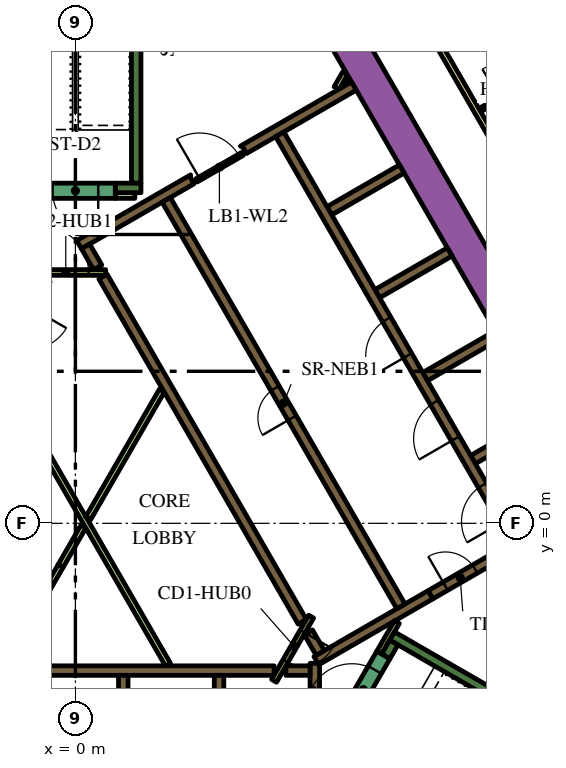
"""IFC4 building model, lengths in metres.
Left out: names, types, materials, properties, quantities, classifications, styles, units other than length and angle.
Written with IfcOpenShell. Run it as: python <this file> out.ifc"""

import sys

from ifc_helpers import new_model, si_unit, direction, frame, frame_2d, origin, place, context, subcontext, project, spatial, polyline, rectangle, outline, extrude, element, fill, save


model = new_model("IFC4")
c1 = context("Model", 3, precision=1e-05, world=origin(), true_north=direction((0.0, 1.0)))
c2 = subcontext(c1, "Body", "Model", "MODEL_VIEW")
j1 = project(units=[si_unit("LENGTHUNIT", "METRE"), si_unit("PLANEANGLEUNIT", "RADIAN")], contexts=[c1])
p1 = place(None, origin())
s1 = spatial("IfcSite", under=j1, at=p1, CompositionType="ELEMENT")
p2 = place(p1, origin())
s2 = spatial("IfcBuilding", under=s1, at=p2, CompositionType="ELEMENT")
p3 = place(p2, frame((0.0, 0.0, 51.0)))
s3 = spatial("IfcBuildingStorey", under=s2, at=p3, CompositionType="ELEMENT", Elevation=51.0)
p4 = place(p3, frame((6.776, 13.364, 0.0), z_axis=(0.0, 0.0, 1.0), x_axis=(0.500004177138, -0.8660229921, 0.0)))
e1 = element("IfcWall", 1, at=p4, inside=s3, PredefinedType="SOLIDWALL", context=c2, shape_type="SweptSolid", body=[
    extrude(rectangle(XDim=20.204, YDim=0.9, at=frame_2d((10.102, 0.0))), origin(), (0.0, 0.0, 1.0), 3.9),
])
p5 = place(p3, frame((8.334, -2.964, 0.0), z_axis=(0.0, 0.0, 1.0), x_axis=(0.866016039709, -0.500016218704, 0.0)))
e2 = element("IfcWall", 2, at=p5, inside=s3, PredefinedType="SOLIDWALL", context=c2, shape_type="SweptSolid", body=[
    extrude(rectangle(XDim=7.05, YDim=0.25, at=frame_2d((3.525, 0.0))), origin(), (0.0, 0.0, 1.0), 3.9),
])
p6 = place(p3, frame((8.168, -3.503, 0.0), z_axis=(0.0, 0.0, 1.0), x_axis=(0.49972245349, 0.866185586049, 0.0)))
e3 = element("IfcWall", 3, at=p6, inside=s3, PredefinedType="SOLIDWALL", context=c2, shape_type="SweptSolid", body=[
    extrude(rectangle(XDim=0.425, YDim=0.25, at=frame_2d((0.212, 0.0))), origin(), (0.0, 0.0, 1.0), 3.9),
])
p7 = place(p3, frame((1.6, 8.95, 0.0), z_axis=(0.0, 0.0, 1.0), x_axis=(0.0, 1.0, 0.0)))
e4 = element("IfcWall", 4, at=p7, inside=s3, PredefinedType="SOLIDWALL", context=c2, shape_type="SweptSolid", body=[
    extrude(rectangle(XDim=6.8, YDim=0.25, at=frame_2d((3.4, 0.0))), origin(), (0.0, 0.0, 1.0), 3.9),
])
p8 = place(p3, frame((1.05, 8.825, 0.0), z_axis=(0.0, 0.0, 1.0), x_axis=(1.0, 0.0, 0.0)))
e5 = element("IfcWall", 5, at=p8, inside=s3, PredefinedType="SOLIDWALL", context=c2, shape_type="SweptSolid", body=[
    extrude(rectangle(XDim=0.675, YDim=0.25, at=frame_2d((0.337, 0.0))), origin(), (0.0, 0.0, 1.0), 3.9),
])
p9 = place(p3, frame((-5.259, -3.875, 0.0), z_axis=(0.0, 0.0, 1.0), x_axis=(1.0, 0.0, 0.0)))
e6 = element("IfcWall", 6, at=p9, inside=s3, PredefinedType="SOLIDWALL", context=c2, shape_type="SweptSolid", body=[
    extrude(rectangle(XDim=10.489, YDim=0.25, at=frame_2d((5.244, 0.0))), origin(), (0.0, 0.0, 1.0), 3.9),
])
for number, where, z_axis, x_axis in (
    (7, (3.78, -4.0, 0.0), (0.0, 0.0, 1.0), (0.0, -1.0, 0.0)),
    (8, (1.26, -4.0, 0.0), (0.0, 0.0, 1.0), (0.0, -1.0, 0.0)),
):
    element("IfcWall", number, at=place(p3, frame(where, z_axis=z_axis, x_axis=x_axis)), inside=s3, PredefinedType="SOLIDWALL", context=c2, shape_type="SweptSolid", body=[
        extrude(rectangle(XDim=2.2, YDim=0.25, at=frame_2d((1.1, 0.0))), origin(), (0.0, 0.0, 1.0), 3.9),
    ])
p10 = place(p3, frame((6.3, -7.27, 0.0), z_axis=(0.0, 0.0, 1.0), x_axis=(0.0, 1.0, 0.0)))
e9 = element("IfcWall", 9, at=p10, inside=s3, PredefinedType="SOLIDWALL", context=c2, shape_type="SweptSolid", body=[
    extrude(rectangle(XDim=3.586, YDim=0.25, at=frame_2d((1.793, 0.0))), origin(), (0.0, 0.0, 1.0), 3.9),
])
p11 = place(p3, frame((5.538, -3.875, 0.0), z_axis=(0.0, 0.0, 1.0), x_axis=(1.0, 0.0, 0.0)))
e10 = element("IfcWall", 10, at=p11, inside=s3, PredefinedType="SOLIDWALL", context=c2, shape_type="SweptSolid", body=[
    extrude(rectangle(XDim=0.637, YDim=0.25, at=frame_2d((0.318, 0.0))), origin(), (0.0, 0.0, 1.0), 3.9),
])
p12 = place(p3, frame((10.464, 1.677, 0.0), z_axis=(0.0, 0.0, 1.0), x_axis=(0.86605622881, 0.499946605688, 0.0)))
e11 = element("IfcWall", 11, at=p12, inside=s3, PredefinedType="SOLIDWALL", context=c2, shape_type="SweptSolid", body=[
    extrude(rectangle(XDim=2.2, YDim=0.25, at=frame_2d((1.1, 0.0))), origin(), (0.0, 0.0, 1.0), 3.9),
])
p13 = place(p3, frame((9.346, -1.879, 0.0), z_axis=(0.0, 0.0, 1.0), x_axis=(-0.866048528039, -0.499959945477, 0.0)))
e12 = element("IfcWall", 12, at=p13, inside=s3, PredefinedType="SOLIDWALL", context=c2, shape_type="SweptSolid", body=[
    extrude(rectangle(XDim=3.47, YDim=0.25, at=frame_2d((1.735, 0.0))), origin(), (0.0, 0.0, 1.0), 3.9),
])
p14 = place(p3, frame((6.13, -2.867, 0.0), z_axis=(0.0, 0.0, 1.0), x_axis=(0.500160776593, -0.865932559475, 0.0)))
e13 = element("IfcWall", 13, at=p14, inside=s3, PredefinedType="SOLIDWALL", context=c2, shape_type="SweptSolid", body=[
    extrude(rectangle(XDim=0.627, YDim=0.25, at=frame_2d((0.313, 0.0))), origin(), (0.0, 0.0, 1.0), 3.9),
])
for number, where, z_axis, x_axis in (
    (14, (9.204, 3.859, 0.0), (0.0, 0.0, 1.0), (0.866, 0.5, 0.0)),
    (15, (7.944, 6.041, 0.0), (0.0, 0.0, 1.0), (0.866, 0.5, 0.0)),
    (16, (6.684, 8.224, 0.0), (0.0, 0.0, 1.0), (0.866, 0.5, 0.0)),
):
    element("IfcWall", number, at=place(p3, frame(where, z_axis=z_axis, x_axis=x_axis)), inside=s3, PredefinedType="SOLIDWALL", context=c2, shape_type="SweptSolid", body=[
        extrude(rectangle(XDim=2.2, YDim=0.25, at=frame_2d((1.1, 0.0))), origin(), (0.0, 0.0, 1.0), 3.9),
    ])
p15 = place(p3, origin())
e17 = element("IfcWall", 17, at=p15, inside=s3, PredefinedType="SOLIDWALL", context=c2, shape_type="SweptSolid", body=[
    extrude(outline(polyline([(2.776, 8.733), (2.499, 8.573), (2.498, 8.573), (2.498, 8.573), (2.282, 8.448), (2.282, 8.448), (0.377, 7.348), (0.16, 7.223), (0.035, 7.439), (3.032, 9.169), (3.03, 9.152), (3.03, 9.133), (3.031, 9.113), (3.035, 9.094), (3.04, 9.075), (3.047, 9.057), (3.056, 9.039), (3.119, 8.931), (2.776, 8.733)])), origin(), (0.0, 0.0, 1.0), 3.9),
])
e18 = element("IfcWall", 18, at=p15, inside=s3, PredefinedType="SOLIDWALL", context=c2, shape_type="SweptSolid", body=[
    extrude(outline(polyline([(5.27, 10.173), (5.27, 10.173), (4.683, 9.834), (4.504, 9.731), (4.442, 9.839), (4.431, 9.856), (4.419, 9.871), (4.406, 9.885), (4.39, 9.898), (4.374, 9.909), (4.357, 9.918), (4.341, 9.925), (7.266, 11.614), (7.391, 11.398), (5.486, 10.298), (5.486, 10.298), (5.27, 10.173), (5.27, 10.173)])), origin(), (0.0, 0.0, 1.0), 3.9),
])
p16 = place(p3, frame((0.268, 7.285, 0.0), z_axis=(0.0, 0.0, 1.0), x_axis=(0.500098681536, -0.865968422476, 0.0)))
e19 = element("IfcWall", 19, at=p16, inside=s3, PredefinedType="SOLIDWALL", context=c2, shape_type="SweptSolid", body=[
    extrude(rectangle(XDim=0.636, YDim=0.25, at=frame_2d((0.318, 0.0))), origin(), (0.0, 0.0, 1.0), 3.9),
])
p17 = place(p3, frame((5.97, -2.591, 0.0), z_axis=(0.0, 0.0, 1.0), x_axis=(-0.499994469932, 0.866028596547, 0.0)))
e20 = element("IfcWall", 20, at=p17, inside=s3, PredefinedType="SOLIDWALL", context=c2, shape_type="SweptSolid", body=[
    extrude(rectangle(XDim=10.488, YDim=0.25, at=frame_2d((5.244, 0.0))), origin(), (0.0, 0.0, 1.0), 3.9),
])
p18 = place(p3, frame((8.459, -2.599, 0.0), z_axis=(0.0, 0.0, 1.0), x_axis=(-0.500041054325, -0.866001699761, 0.0)))
e21 = element("IfcWall", 21, at=p18, inside=s3, PredefinedType="PARTITIONING", context=c2, shape_type="SweptSolid", body=[
    extrude(rectangle(XDim=0.929, YDim=0.15, at=frame_2d((0.464, 0.0))), origin(), (0.0, 0.0, 1.0), 3.9),
])
p19 = place(p3, frame((2.435, -3.718, 0.0), z_axis=(0.0, 0.0, 1.0), x_axis=(-0.499985176046, 0.866033962229, 0.0)))
e22 = element("IfcWall", 22, at=p19, inside=s3, PredefinedType="PARTITIONING", context=c2, shape_type="SweptSolid", body=[
    extrude(rectangle(XDim=8.875, YDim=0.15, at=frame_2d((4.438, 0.0))), origin(), (0.0, 0.0, 1.0), 2.75),
])
p20 = place(p3, frame((0.336, 0.132, 0.0), z_axis=(0.0, 0.0, 1.0), x_axis=(0.500001957507, 0.866024273614, 0.0)))
e23 = element("IfcWall", 23, at=p20, inside=s3, PredefinedType="PARTITIONING", context=c2, shape_type="SweptSolid", body=[
    extrude(rectangle(XDim=3.881, YDim=0.15, at=frame_2d((1.941, 0.0))), origin(), (0.0, 0.0, 1.0), 2.75),
])
p21 = place(p3, frame((-0.387, -1.121, 0.0), z_axis=(0.0, 0.0, 1.0), x_axis=(0.500057179532, 0.865992388649, 0.0)))
e24 = element("IfcWall", 24, at=p21, inside=s3, PredefinedType="PARTITIONING", context=c2, shape_type="SweptSolid", body=[
    extrude(rectangle(XDim=1.199, YDim=0.15, at=frame_2d((0.6, 0.0))), origin(), (0.0, 0.0, 1.0), 2.75),
])
p22 = place(p3, frame((1.05, 8.625, 0.0), z_axis=(0.0, 0.0, 1.0), x_axis=(1.0, 0.0, 0.0)))
e25 = element("IfcWall", 25, at=p22, inside=s3, PredefinedType="PARTITIONING", context=c2, shape_type="SweptSolid", body=[
    extrude(rectangle(XDim=0.514, YDim=0.15, at=frame_2d((0.257, 0.0))), origin(), (0.0, 0.0, 1.0), 2.75),
])
p23 = place(p3, frame((6.872, 11.45, 0.0), z_axis=(0.0, 0.0, 1.0), x_axis=(0.499846793097, 0.866113839764, 0.0)))
e26 = element("IfcWall", 26, at=p23, inside=s3, PredefinedType="PARTITIONING", context=c2, shape_type="SweptSolid", body=[
    extrude(rectangle(XDim=0.453, YDim=0.15, at=frame_2d((0.227, 0.0))), origin(), (0.0, 0.0, 1.0), 2.75),
])
p24 = place(p3, frame((7.131, 11.6, 0.0), z_axis=(0.0, 0.0, 1.0), x_axis=(0.498600033135, 0.866832167699, 0.0)))
e27 = element("IfcWall", 27, at=p24, inside=s3, PredefinedType="PARTITIONING", context=c2, shape_type="SweptSolid", body=[
    extrude(rectangle(XDim=0.107, YDim=0.15, at=frame_2d((0.053, 0.0))), origin(), (0.0, 0.0, 1.0), 2.75),
])
p25 = place(p3, frame((11.553, -0.46, 0.0), z_axis=(0.0, 0.0, 1.0), x_axis=(-0.500006514828, 0.866021642414, 0.0)))
e28 = element("IfcWall", 28, at=p25, inside=s3, PredefinedType="SOLIDWALL", context=c2, shape_type="SweptSolid", body=[
    extrude(rectangle(XDim=12.35, YDim=0.25, at=frame_2d((6.175, 0.0))), origin(), (0.0, 0.0, 1.0), 3.9),
])
p26 = place(p25, frame((0.585, 0.0, 0.0)))
e29 = element("IfcOpeningElement", 29, at=p26, cuts=e28, PredefinedType="OPENING", context=c2, shape_type="SweptSolid", body=[
    extrude(rectangle(XDim=1.1, YDim=2.1, at=frame_2d((0.55, 1.05))), frame((0.0, 0.135, 0.0), z_axis=(0.0, -1.0, 0.0), x_axis=(1.0, 0.0, 0.0)), (0.0, 0.0, 1.0), 0.27),
])
p27 = place(p25, frame((3.105, 0.0, 0.0)))
e30 = element("IfcOpeningElement", 30, at=p27, cuts=e28, PredefinedType="OPENING", context=c2, shape_type="SweptSolid", body=[
    extrude(rectangle(XDim=1.1, YDim=2.1, at=frame_2d((0.55, 1.05))), frame((0.0, 0.135, 0.0), z_axis=(0.0, -1.0, 0.0), x_axis=(1.0, 0.0, 0.0)), (0.0, 0.0, 1.0), 0.27),
])
p28 = place(p25, frame((5.625, 0.0, 0.0)))
e31 = element("IfcOpeningElement", 31, at=p28, cuts=e28, PredefinedType="OPENING", context=c2, shape_type="SweptSolid", body=[
    extrude(rectangle(XDim=1.1, YDim=2.1, at=frame_2d((0.55, 1.05))), frame((0.0, 0.135, 0.0), z_axis=(0.0, -1.0, 0.0), x_axis=(1.0, 0.0, 0.0)), (0.0, 0.0, 1.0), 0.27),
])
p29 = place(p3, frame((8.565, -2.185, 0.0), z_axis=(0.0, 0.0, 1.0), x_axis=(-0.499997954832, 0.866026584559, 0.0)))
e32 = element("IfcWall", 32, at=p29, inside=s3, PredefinedType="SOLIDWALL", context=c2, shape_type="SweptSolid", body=[
    extrude(rectangle(XDim=12.35, YDim=0.25, at=frame_2d((6.175, 0.0))), origin(), (0.0, 0.0, 1.0), 3.9),
])
p30 = place(p29, frame((5.725, 0.0, 0.0)))
e33 = element("IfcOpeningElement", 33, at=p30, cuts=e32, PredefinedType="OPENING", context=c2, shape_type="SweptSolid", body=[
    extrude(rectangle(XDim=0.9, YDim=2.1, at=frame_2d((0.45, 1.05))), frame((0.0, 0.135, 0.0), z_axis=(0.0, -1.0, 0.0), x_axis=(1.0, 0.0, 0.0)), (0.0, 0.0, 1.0), 0.27),
])
p31 = place(p3, frame((7.053, -5.284, 0.0), z_axis=(0.0, 0.0, 1.0), x_axis=(0.500078061341, 0.865980330357, 0.0)))
e34 = element("IfcWall", 34, at=p31, inside=s3, PredefinedType="SOLIDWALL", context=c2, shape_type="SweptSolid", body=[
    extrude(rectangle(XDim=2.1, YDim=0.4, at=frame_2d((1.05, 0.0))), origin(), (0.0, 0.0, 1.0), 3.9),
])
p32 = place(p31, frame((0.45, 0.0, 0.0)))
e35 = element("IfcOpeningElement", 35, at=p32, cuts=e34, PredefinedType="OPENING", context=c2, shape_type="SweptSolid", body=[
    extrude(rectangle(XDim=1.2, YDim=2.1, at=frame_2d((0.6, 1.05))), frame((0.0, 0.21, 0.0), z_axis=(0.0, -1.0, 0.0), x_axis=(1.0, 0.0, 0.0)), (0.0, 0.0, 1.0), 0.42),
])
p33 = place(p3, frame((9.346, -1.879, 0.0), z_axis=(0.0, 0.0, 1.0), x_axis=(0.866047807691, 0.499961193289, 0.0)))
e36 = element("IfcWall", 36, at=p33, inside=s3, PredefinedType="SOLIDWALL", context=c2, shape_type="SweptSolid", body=[
    extrude(rectangle(XDim=1.8, YDim=0.25, at=frame_2d((0.9, 0.0))), origin(), (0.0, 0.0, 1.0), 3.9),
])
p34 = place(p33, frame((0.45, 0.0, 0.0)))
e37 = element("IfcOpeningElement", 37, at=p34, cuts=e36, PredefinedType="OPENING", context=c2, shape_type="SweptSolid", body=[
    extrude(rectangle(XDim=0.9, YDim=2.1, at=frame_2d((0.45, 1.05))), frame((0.0, 0.135, 0.0), z_axis=(0.0, -1.0, 0.0), x_axis=(1.0, 0.0, 0.0)), (0.0, 0.0, 1.0), 0.27),
])
p35 = place(p3, frame((1.05, 8.75, 0.0), z_axis=(0.0, 0.0, 1.0), x_axis=(-1.0, 0.0, 0.0)))
e38 = element("IfcWall", 38, at=p35, inside=s3, PredefinedType="SOLIDWALL", context=c2, shape_type="SweptSolid", body=[
    extrude(rectangle(XDim=2.1, YDim=0.4, at=frame_2d((1.05, 0.0))), origin(), (0.0, 0.0, 1.0), 3.9),
])
p36 = place(p35, frame((0.45, 0.0, 0.0)))
e39 = element("IfcOpeningElement", 39, at=p36, cuts=e38, PredefinedType="OPENING", context=c2, shape_type="SweptSolid", body=[
    extrude(rectangle(XDim=1.2, YDim=2.1, at=frame_2d((0.6, 1.05))), frame((0.0, 0.21, 0.0), z_axis=(0.0, -1.0, 0.0), x_axis=(1.0, 0.0, 0.0)), (0.0, 0.0, 1.0), 0.42),
])
p37 = place(p3, frame((6.203, -2.456, 0.0), z_axis=(0.0, 0.0, 1.0), x_axis=(-0.500043961785, -0.866000020948, 0.0)))
e40 = element("IfcWall", 40, at=p37, inside=s3, PredefinedType="PARTITIONING", context=c2, shape_type="SweptSolid", body=[
    extrude(rectangle(XDim=1.95, YDim=0.15, at=frame_2d((0.975, 0.0))), origin(), (0.0, 0.0, 1.0), 3.9),
])
p38 = place(p37, frame((0.45, 0.0, 0.0)))
e41 = element("IfcOpeningElement", 41, at=p38, cuts=e40, PredefinedType="OPENING", context=c2, shape_type="SweptSolid", body=[
    extrude(rectangle(XDim=0.9, YDim=2.1, at=frame_2d((0.45, 1.05))), frame((0.0, 0.085, 0.0), z_axis=(0.0, -1.0, 0.0), x_axis=(1.0, 0.0, 0.0)), (0.0, 0.0, 1.0), 0.17),
])
p39 = place(p3, frame((-1.303, 6.6, 0.0), z_axis=(0.0, 0.0, 1.0), x_axis=(1.0, 0.0, 0.0)))
e42 = element("IfcWall", 42, at=p39, inside=s3, PredefinedType="PARTITIONING", context=c2, shape_type="SweptSolid", body=[
    extrude(rectangle(XDim=2.1, YDim=0.15, at=frame_2d((1.05, 0.0))), origin(), (0.0, 0.0, 1.0), 3.9),
])
p40 = place(p39, frame((0.45, 0.0, 0.0)))
e43 = element("IfcOpeningElement", 43, at=p40, cuts=e42, PredefinedType="OPENING", context=c2, shape_type="SweptSolid", body=[
    extrude(rectangle(XDim=1.2, YDim=2.1, at=frame_2d((0.6, 1.05))), frame((0.0, 0.085, 0.0), z_axis=(0.0, -1.0, 0.0), x_axis=(1.0, 0.0, 0.0)), (0.0, 0.0, 1.0), 0.17),
])
p41 = place(p3, frame((3.183, 9.02, 0.0), z_axis=(0.0, 0.0, 1.0), x_axis=(0.866034573852, 0.49998411664, 0.0)))
e44 = element("IfcWall", 44, at=p41, inside=s3, PredefinedType="PARTITIONING", context=c2, shape_type="SweptSolid", body=[
    extrude(rectangle(XDim=1.4, YDim=0.09, at=frame_2d((0.7, 0.0))), origin(), (0.0, 0.0, 1.0), 2.75),
])
p42 = place(p41, frame((0.1, 0.0, 0.0)))
e45 = element("IfcOpeningElement", 45, at=p42, cuts=e44, PredefinedType="OPENING", context=c2, shape_type="SweptSolid", body=[
    extrude(rectangle(XDim=1.2, YDim=2.1, at=frame_2d((0.6, 1.05))), frame((0.0, 0.055, 0.0), z_axis=(0.0, -1.0, 0.0), x_axis=(1.0, 0.0, 0.0)), (0.0, 0.0, 1.0), 0.11),
])
p43 = place(p3, frame((-1.287, -2.679, 0.0), z_axis=(0.0, 0.0, 1.0), x_axis=(0.499961193289, 0.866047807691, 0.0)))
e46 = element("IfcWall", 46, at=p43, inside=s3, PredefinedType="PARTITIONING", context=c2, shape_type="SweptSolid", body=[
    extrude(rectangle(XDim=1.8, YDim=0.15, at=frame_2d((0.9, 0.0))), origin(), (0.0, 0.0, 1.0), 2.75),
])
p44 = place(p43, frame((0.45, 0.0, 0.0)))
e47 = element("IfcOpeningElement", 47, at=p44, cuts=e46, PredefinedType="OPENING", context=c2, shape_type="SweptSolid", body=[
    extrude(rectangle(XDim=0.9, YDim=2.1, at=frame_2d((0.45, 1.05))), frame((0.0, 0.085, 0.0), z_axis=(0.0, -1.0, 0.0), x_axis=(1.0, 0.0, 0.0)), (0.0, 0.0, 1.0), 0.17),
])
p45 = place(p3, frame((6.163, 18.475, 0.0), z_axis=(0.0, 0.0, 1.0), x_axis=(0.500001317485, -0.866024643133, 0.0)))
e48 = element("IfcWall", 48, at=p45, inside=s3, PredefinedType="PARTITIONING", context=c2, shape_type="SweptSolid", body=[
    extrude(rectangle(XDim=25.767, YDim=0.15, at=frame_2d((12.883, 0.0))), origin(), (0.0, 0.0, 1.0), 2.75),
])
p46 = place(p45, frame((24.586, 0.0, 0.0)))
e49 = element("IfcOpeningElement", 49, at=p46, cuts=e48, PredefinedType="OPENING", context=c2, shape_type="SweptSolid", body=[
    extrude(rectangle(XDim=1.0, YDim=2.1, at=frame_2d((0.5, 1.05))), frame((0.0, 0.085, 0.0), z_axis=(0.0, -1.0, 0.0), x_axis=(1.0, 0.0, 0.0)), (0.0, 0.0, 1.0), 0.17),
])
p47 = place(p45, frame((13.144, 0.0, 0.0)))
e50 = element("IfcOpeningElement", 50, at=p47, cuts=e48, PredefinedType="OPENING", context=c2, shape_type="SweptSolid", body=[
    extrude(rectangle(XDim=1.0, YDim=2.1, at=frame_2d((0.5, 1.05))), frame((0.0, 0.085, 0.0), z_axis=(0.0, -1.0, 0.0), x_axis=(1.0, 0.0, 0.0)), (0.0, 0.0, 1.0), 0.17),
])
p48 = place(p45, frame((11.692, 0.0, 0.0)))
e51 = element("IfcOpeningElement", 51, at=p48, cuts=e48, PredefinedType="OPENING", context=c2, shape_type="SweptSolid", body=[
    extrude(rectangle(XDim=1.0, YDim=2.1, at=frame_2d((0.5, 1.05))), frame((0.0, 0.085, 0.0), z_axis=(0.0, -1.0, 0.0), x_axis=(1.0, 0.0, 0.0)), (0.0, 0.0, 1.0), 0.17),
])
p49 = place(p45, frame((0.572, 0.0, 0.0)))
e52 = element("IfcOpeningElement", 52, at=p49, cuts=e48, PredefinedType="OPENING", context=c2, shape_type="SweptSolid", body=[
    extrude(rectangle(XDim=1.0, YDim=2.1, at=frame_2d((0.5, 1.05))), frame((0.0, 0.085, 0.0), z_axis=(0.0, -1.0, 0.0), x_axis=(1.0, 0.0, 0.0)), (0.0, 0.0, 1.0), 0.17),
])
p50 = place(p3, frame((10.64, 10.871, 0.0), z_axis=(0.0, 0.0, 1.0), x_axis=(0.866036505625, 0.499980770555, 0.0)))
e53 = element("IfcWall", 53, at=p50, inside=s3, PredefinedType="PARTITIONING", context=c2, shape_type="SweptSolid", body=[
    extrude(rectangle(XDim=2.7, YDim=0.1, at=frame_2d((1.35, 0.0))), origin(), (0.0, 0.0, 1.0), 2.75),
])
p51 = place(p50, frame((0.6, 0.0, 0.0)))
e54 = element("IfcOpeningElement", 54, at=p51, cuts=e53, PredefinedType="OPENING", context=c2, shape_type="SweptSolid", body=[
    extrude(rectangle(XDim=0.9, YDim=2.1, at=frame_2d((0.45, 1.05))), frame((0.0, 0.06, 0.0), z_axis=(0.0, -1.0, 0.0), x_axis=(1.0, 0.0, 0.0)), (0.0, 0.0, 1.0), 0.12),
])
p52 = place(p26, origin())
e55 = element("IfcDoor", 55, at=p52, inside=s3, OperationType="DOUBLE_DOOR_SLIDING", PredefinedType="DOOR", context=c2, shape_type="SweptSolid", body=[
    extrude(rectangle(XDim=1.1, YDim=2.1, at=frame_2d((0.55, 1.05))), frame((0.0, 0.025, 0.0), z_axis=(0.0, -1.0, 0.0), x_axis=(1.0, 0.0, 0.0)), (0.0, 0.0, 1.0), 0.05),
])
fill(e29, e55)
p53 = place(p27, origin())
e56 = element("IfcDoor", 56, at=p53, inside=s3, OperationType="DOUBLE_DOOR_SLIDING", PredefinedType="DOOR", context=c2, shape_type="SweptSolid", body=[
    extrude(rectangle(XDim=1.1, YDim=2.1, at=frame_2d((0.55, 1.05))), frame((0.0, 0.025, 0.0), z_axis=(0.0, -1.0, 0.0), x_axis=(1.0, 0.0, 0.0)), (0.0, 0.0, 1.0), 0.05),
])
fill(e30, e56)
p54 = place(p28, origin())
e57 = element("IfcDoor", 57, at=p54, inside=s3, OperationType="DOUBLE_DOOR_SLIDING", PredefinedType="DOOR", context=c2, shape_type="SweptSolid", body=[
    extrude(rectangle(XDim=1.1, YDim=2.1, at=frame_2d((0.55, 1.05))), frame((0.0, 0.025, 0.0), z_axis=(0.0, -1.0, 0.0), x_axis=(1.0, 0.0, 0.0)), (0.0, 0.0, 1.0), 0.05),
])
fill(e31, e57)
p55 = place(p30, origin())
e58 = element("IfcDoor", 58, at=p55, inside=s3, OperationType="SINGLE_SWING_LEFT", PredefinedType="DOOR", context=c2, shape_type="SweptSolid", body=[
    extrude(rectangle(XDim=0.9, YDim=2.1, at=frame_2d((0.45, 1.05))), frame((0.0, 0.025, 0.0), z_axis=(0.0, -1.0, 0.0), x_axis=(1.0, 0.0, 0.0)), (0.0, 0.0, 1.0), 0.05),
])
fill(e33, e58)
p56 = place(p32, origin())
e59 = element("IfcDoor", 59, at=p56, inside=s3, OperationType="SINGLE_SWING_LEFT", PredefinedType="DOOR", context=c2, shape_type="SweptSolid", body=[
    extrude(rectangle(XDim=1.2, YDim=2.1, at=frame_2d((0.6, 1.05))), frame((0.0, 0.025, 0.0), z_axis=(0.0, -1.0, 0.0), x_axis=(1.0, 0.0, 0.0)), (0.0, 0.0, 1.0), 0.05),
])
fill(e35, e59)
p57 = place(p34, origin())
e60 = element("IfcDoor", 60, at=p57, inside=s3, OperationType="SINGLE_SWING_LEFT", PredefinedType="DOOR", context=c2, shape_type="SweptSolid", body=[
    extrude(rectangle(XDim=0.9, YDim=2.1, at=frame_2d((0.45, 1.05))), frame((0.0, 0.025, 0.0), z_axis=(0.0, -1.0, 0.0), x_axis=(1.0, 0.0, 0.0)), (0.0, 0.0, 1.0), 0.05),
])
fill(e37, e60)
p58 = place(p36, origin())
e61 = element("IfcDoor", 61, at=p58, inside=s3, OperationType="SINGLE_SWING_LEFT", PredefinedType="DOOR", context=c2, shape_type="SweptSolid", body=[
    extrude(rectangle(XDim=1.2, YDim=2.1, at=frame_2d((0.6, 1.05))), frame((0.0, 0.025, 0.0), z_axis=(0.0, -1.0, 0.0), x_axis=(1.0, 0.0, 0.0)), (0.0, 0.0, 1.0), 0.05),
])
fill(e39, e61)
p59 = place(p38, origin())
e62 = element("IfcDoor", 62, at=p59, inside=s3, OperationType="SINGLE_SWING_LEFT", PredefinedType="DOOR", context=c2, shape_type="SweptSolid", body=[
    extrude(rectangle(XDim=0.9, YDim=2.1, at=frame_2d((0.45, 1.05))), frame((0.0, 0.025, 0.0), z_axis=(0.0, -1.0, 0.0), x_axis=(1.0, 0.0, 0.0)), (0.0, 0.0, 1.0), 0.05),
])
fill(e41, e62)
p60 = place(p40, origin())
e63 = element("IfcDoor", 63, at=p60, inside=s3, OperationType="SINGLE_SWING_LEFT", PredefinedType="DOOR", context=c2, shape_type="SweptSolid", body=[
    extrude(rectangle(XDim=1.2, YDim=2.1, at=frame_2d((0.6, 1.05))), frame((0.0, 0.025, 0.0), z_axis=(0.0, -1.0, 0.0), x_axis=(1.0, 0.0, 0.0)), (0.0, 0.0, 1.0), 0.05),
])
fill(e43, e63)
p61 = place(p42, origin())
e64 = element("IfcDoor", 64, at=p61, inside=s3, OperationType="SINGLE_SWING_LEFT", PredefinedType="DOOR", context=c2, shape_type="SweptSolid", body=[
    extrude(rectangle(XDim=1.2, YDim=2.1, at=frame_2d((0.6, 1.05))), frame((0.0, 0.025, 0.0), z_axis=(0.0, -1.0, 0.0), x_axis=(1.0, 0.0, 0.0)), (0.0, 0.0, 1.0), 0.05),
])
fill(e45, e64)
p62 = place(p44, origin())
e65 = element("IfcDoor", 65, at=p62, inside=s3, OperationType="SINGLE_SWING_LEFT", PredefinedType="DOOR", context=c2, shape_type="SweptSolid", body=[
    extrude(rectangle(XDim=0.9, YDim=2.1, at=frame_2d((0.45, 1.05))), frame((0.0, 0.025, 0.0), z_axis=(0.0, -1.0, 0.0), x_axis=(1.0, 0.0, 0.0)), (0.0, 0.0, 1.0), 0.05),
])
fill(e47, e65)
save(model, sys.argv[1])
